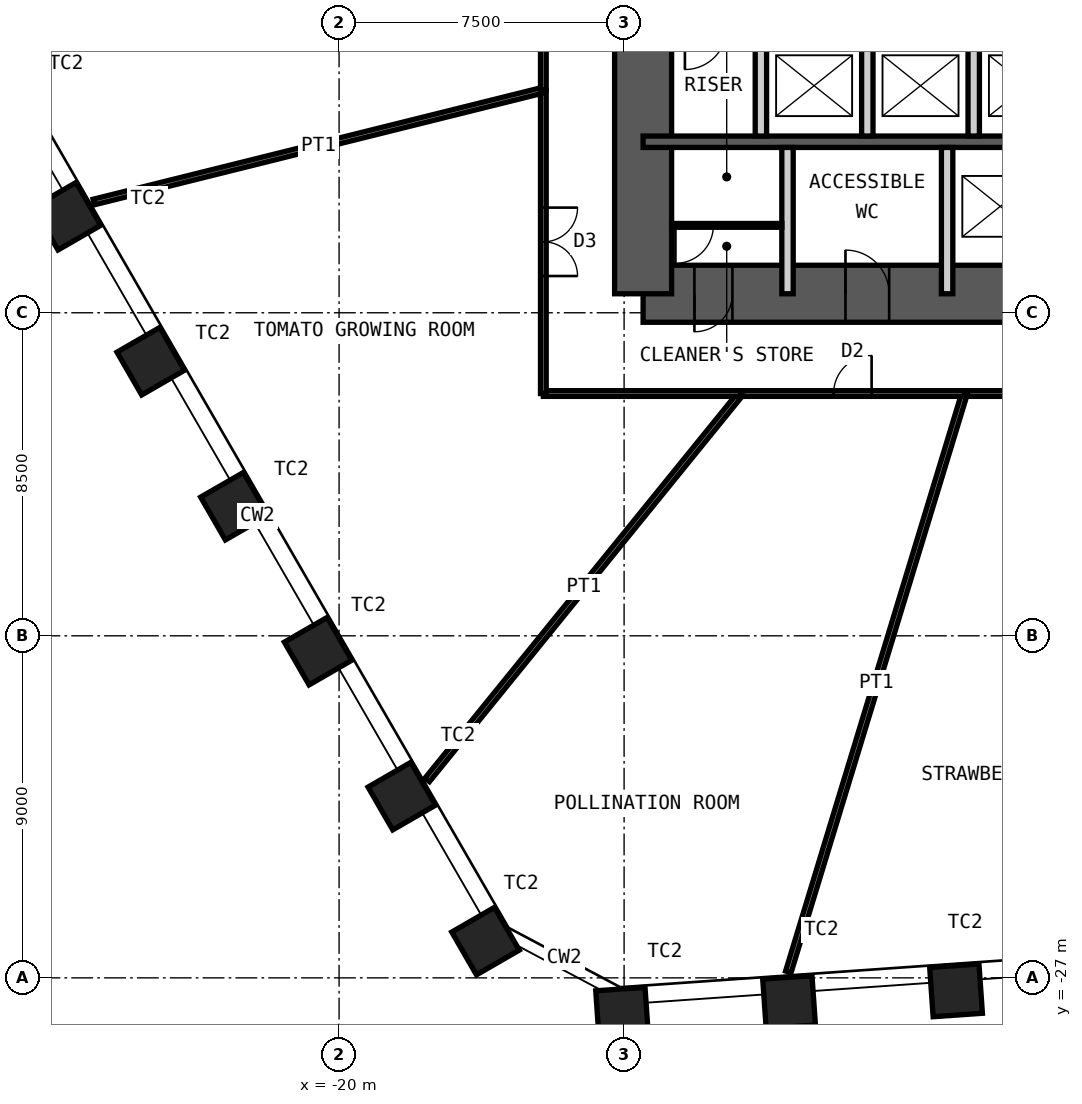
"""IFC4 building model, lengths in metres.
Left out: names, types, materials, properties, quantities, classifications, styles, units other than length and angle.
Written with IfcOpenShell. Run it as: python <this file> out.ifc"""

import sys

from ifc_helpers import new_model, si_unit, direction, frame, frame_2d, origin, origin_2d, place, context, subcontext, project, spatial, rectangle, hollow_rectangle, extrude, element, fill, save


model = new_model("IFC4")
c1 = context("Model", 3, precision=1e-05, world=origin(), true_north=direction((0.0, 1.0)))
c2 = subcontext(c1, "Body", "Model", "MODEL_VIEW")
j1 = project(units=[si_unit("LENGTHUNIT", "METRE"), si_unit("PLANEANGLEUNIT", "RADIAN")], contexts=[c1])
p1 = place(None, origin())
s1 = spatial("IfcSite", under=j1, at=p1, CompositionType="ELEMENT")
p2 = place(p1, origin())
s2 = spatial("IfcBuilding", under=s1, at=p2, CompositionType="ELEMENT")
p3 = place(p2, frame((0.0, 0.0, 72.0)))
s3 = spatial("IfcBuildingStorey", under=s2, at=p3, CompositionType="ELEMENT", Elevation=72.0)
for number, where, z_axis, x_axis in (
    (1, (-3.765, -27.329, 0.0), (0.0, 0.0, 1.0), (0.998, 0.07, 0.0)),
    (2, (-8.159, -27.636, 0.0), (0.0, 0.0, 1.0), (0.998, 0.07, 0.0)),
    (3, (-12.553, -27.944, 0.0), (0.0, 0.0, 1.0), (0.998, 0.07, 0.0)),
    (4, (-16.147, -26.033, 0.0), (0.0, 0.0, 1.0), (0.5, -0.866, 0.0)),
    (5, (-18.349, -22.218, 0.0), (0.0, 0.0, 1.0), (0.5, -0.866, 0.0)),
    (6, (-20.552, -18.404, 0.0), (0.0, 0.0, 1.0), (0.5, -0.866, 0.0)),
    (7, (-22.754, -14.589, 0.0), (0.0, 0.0, 1.0), (0.5, -0.866, 0.0)),
    (8, (-24.956, -10.775, 0.0), (0.0, 0.0, 1.0), (0.5, -0.866, 0.0)),
    (9, (-27.158, -6.96, 0.0), (0.0, 0.0, 1.0), (0.5, -0.866, 0.0)),
):
    element("IfcColumn", number, at=place(p3, frame(where, z_axis=z_axis, x_axis=x_axis)), inside=s3, PredefinedType="COLUMN", context=c2, shape_type="SweptSolid", body=[
        extrude(hollow_rectangle(XDim=1.3, YDim=1.3, WallThickness=0.1, at=origin_2d()), origin(), (0.0, 0.0, 1.0), 5.0),
    ])
p4 = place(p3, frame((-12.0, -9.0, 0.0), z_axis=(0.0, 0.0, 1.0), x_axis=(1.0, 0.0, 0.0)))
e10 = element("IfcWall", 10, at=p4, inside=s3, PredefinedType="SHEAR", context=c2, shape_type="SweptSolid", body=[
    extrude(rectangle(XDim=24.0, YDim=1.5, at=frame_2d((12.0, 0.0))), origin(), (0.0, 0.0, 1.0), 5.0),
])
p5 = place(p4, frame((1.35, 0.0, 0.0)))
e11 = element("IfcOpeningElement", 11, at=p5, cuts=e10, PredefinedType="OPENING", context=c2, shape_type="SweptSolid", body=[
    extrude(rectangle(XDim=1.0, YDim=2.1, at=frame_2d((0.5, 1.05))), frame((0.0, 0.76, 0.0), z_axis=(0.0, -1.0, 0.0), x_axis=(1.0, 0.0, 0.0)), (0.0, 0.0, 1.0), 1.52),
])
p6 = place(p4, frame((5.325, 0.0, 0.0)))
e12 = element("IfcOpeningElement", 12, at=p6, cuts=e10, PredefinedType="OPENING", context=c2, shape_type="SweptSolid", body=[
    extrude(rectangle(XDim=1.15, YDim=2.1, at=frame_2d((0.575, 1.05))), frame((0.0, 0.76, 0.0), z_axis=(0.0, -1.0, 0.0), x_axis=(1.0, 0.0, 0.0)), (0.0, 0.0, 1.0), 1.52),
])
p7 = place(p4, frame((12.6, 0.0, 0.0)))
e13 = element("IfcOpeningElement", 13, at=p7, cuts=e10, PredefinedType="OPENING", context=c2, shape_type="SweptSolid", body=[
    extrude(rectangle(XDim=1.0, YDim=2.1, at=frame_2d((0.5, 1.05))), frame((0.0, 0.76, 0.0), z_axis=(0.0, -1.0, 0.0), x_axis=(1.0, 0.0, 0.0)), (0.0, 0.0, 1.0), 1.52),
])
p8 = place(p3, frame((-12.0, -9.0, 0.0), z_axis=(0.0, 0.0, 1.0), x_axis=(0.0, 1.0, 0.0)))
e14 = element("IfcWall", 14, at=p8, inside=s3, PredefinedType="SHEAR", context=c2, shape_type="SweptSolid", body=[
    extrude(rectangle(XDim=18.0, YDim=1.5, at=frame_2d((9.0, 0.0))), origin(), (0.0, 0.0, 1.0), 5.0),
])
p9 = place(p8, frame((8.1, 0.0, 0.0)))
e15 = element("IfcOpeningElement", 15, at=p9, cuts=e14, PredefinedType="OPENING", context=c2, shape_type="SweptSolid", body=[
    extrude(rectangle(XDim=1.8, YDim=2.1, at=frame_2d((0.9, 1.05))), frame((0.0, 0.76, 0.0), z_axis=(0.0, -1.0, 0.0), x_axis=(1.0, 0.0, 0.0)), (0.0, 0.0, 1.0), 1.52),
])
p10 = place(p3, frame((-12.0, -5.0, 0.0), z_axis=(0.0, 0.0, 1.0), x_axis=(1.0, 0.0, 0.0)))
e16 = element("IfcWall", 16, at=p10, inside=s3, PredefinedType="SHEAR", context=c2, shape_type="SweptSolid", body=[
    extrude(rectangle(XDim=24.0, YDim=0.3, at=frame_2d((12.0, 0.0))), origin(), (0.0, 0.0, 1.0), 5.0),
])
for number, where, z_axis, x_axis in (
    (17, (-8.9, -4.85, 0.0), (0.0, 0.0, 1.0), (0.0, 1.0, 0.0)),
    (18, (-6.1, -4.85, 0.0), (0.0, 0.0, 1.0), (0.0, 1.0, 0.0)),
    (19, (-3.3, -4.85, 0.0), (0.0, 0.0, 1.0), (0.0, 1.0, 0.0)),
):
    element("IfcWall", number, at=place(p3, frame(where, z_axis=z_axis, x_axis=x_axis)), inside=s3, PredefinedType="PARTITIONING", context=c2, shape_type="SweptSolid", body=[
        extrude(rectangle(XDim=2.65, YDim=0.3, at=frame_2d((1.325, 0.0))), origin(), (0.0, 0.0, 1.0), 4.78),
    ])
for number, where, z_axis, x_axis in (
    (20, (-8.2, -9.0, 0.0), (0.0, 0.0, 1.0), (0.0, 1.0, 0.0)),
    (21, (-4.0, -9.0, 0.0), (0.0, 0.0, 1.0), (0.0, 1.0, 0.0)),
):
    element("IfcWall", number, at=place(p3, frame(where, z_axis=z_axis, x_axis=x_axis)), inside=s3, PredefinedType="PARTITIONING", context=c2, shape_type="SweptSolid", body=[
        extrude(rectangle(XDim=3.85, YDim=0.3, at=frame_2d((1.925, 0.0))), origin(), (0.0, 0.0, 1.0), 4.78),
    ])
p11 = place(p3, frame((-11.25, -7.2, 0.0), z_axis=(0.0, 0.0, 1.0), x_axis=(1.0, 0.0, 0.0)))
e22 = element("IfcWall", 22, at=p11, inside=s3, PredefinedType="PARTITIONING", context=c2, shape_type="SweptSolid", body=[
    extrude(rectangle(XDim=2.9, YDim=0.1, at=frame_2d((1.45, 0.0))), origin(), (0.0, 0.0, 1.0), 4.78),
])
p12 = place(p11, frame((0.1, 0.0, 0.0)))
e23 = element("IfcOpeningElement", 23, at=p12, cuts=e22, PredefinedType="OPENING", context=c2, shape_type="SweptSolid", body=[
    extrude(rectangle(XDim=1.0, YDim=2.4, at=frame_2d((0.5, 1.2))), frame((0.0, 0.06, 0.0), z_axis=(0.0, -1.0, 0.0), x_axis=(1.0, 0.0, 0.0)), (0.0, 0.0, 1.0), 0.12),
])
p13 = place(p3, frame((2.222, -11.625, 0.0), z_axis=(0.0, 0.0, 1.0), x_axis=(-1.0, 0.0, 0.0)))
e24 = element("IfcWall", 24, at=p13, inside=s3, PredefinedType="PARTITIONING", context=c2, shape_type="SweptSolid", body=[
    extrude(rectangle(XDim=5.764, YDim=0.15, at=frame_2d((2.882, 0.0))), origin(), (0.0, 0.0, 1.0), 4.8),
])
p14 = place(p13, frame((1.982, 0.0, 0.0)))
e25 = element("IfcOpeningElement", 25, at=p14, cuts=e24, PredefinedType="OPENING", context=c2, shape_type="SweptSolid", body=[
    extrude(rectangle(XDim=1.8, YDim=2.4, at=frame_2d((0.9, 1.2))), frame((0.0, 0.085, 0.0), z_axis=(0.0, -1.0, 0.0), x_axis=(1.0, 0.0, 0.0)), (0.0, 0.0, 1.0), 0.17),
])
p15 = place(p3, frame((-8.179, -26.843, 0.0), z_axis=(0.0, 0.0, 1.0), x_axis=(0.291466333136, 0.956581087336, 0.0)))
e26 = element("IfcWall", 26, at=p15, inside=s3, PredefinedType="PARTITIONING", context=c2, shape_type="SweptSolid", body=[
    extrude(rectangle(XDim=15.908, YDim=0.15, at=frame_2d((7.954, 0.0))), origin(), (0.0, 0.0, 1.0), 3.7),
])
p16 = place(p3, frame((-3.542, -11.625, 0.0), z_axis=(0.0, 0.0, 1.0), x_axis=(-1.0, 0.0, 0.0)))
e27 = element("IfcWall", 27, at=p16, inside=s3, PredefinedType="PARTITIONING", context=c2, shape_type="SweptSolid", body=[
    extrude(rectangle(XDim=5.89, YDim=0.15, at=frame_2d((2.945, 0.0))), origin(), (0.0, 0.0, 1.0), 4.8),
])
p17 = place(p16, frame((2.445, 0.0, 0.0)))
e28 = element("IfcOpeningElement", 28, at=p17, cuts=e27, PredefinedType="OPENING", context=c2, shape_type="SweptSolid", body=[
    extrude(rectangle(XDim=1.0, YDim=2.4, at=frame_2d((0.5, 1.2))), frame((0.0, 0.085, 0.0), z_axis=(0.0, -1.0, 0.0), x_axis=(1.0, 0.0, 0.0)), (0.0, 0.0, 1.0), 0.17),
])
p18 = place(p3, frame((-17.68, -21.791, 0.0), z_axis=(0.0, 0.0, 1.0), x_axis=(0.630054650118, 0.776550795418, 0.0)))
e29 = element("IfcWall", 29, at=p18, inside=s3, PredefinedType="PARTITIONING", context=c2, shape_type="SweptSolid", body=[
    extrude(rectangle(XDim=13.091, YDim=0.15, at=frame_2d((6.545, 0.0))), origin(), (0.0, 0.0, 1.0), 3.7),
])
p19 = place(p3, frame((-9.432, -11.625, 0.0), z_axis=(0.0, 0.0, 1.0), x_axis=(-1.0, 0.0, 0.0)))
e30 = element("IfcWall", 30, at=p19, inside=s3, PredefinedType="PARTITIONING", context=c2, shape_type="SweptSolid", body=[
    extrude(rectangle(XDim=5.193, YDim=0.15, at=frame_2d((2.596, 0.0))), origin(), (0.0, 0.0, 1.0), 4.8),
])
p20 = place(p3, frame((-14.625, -11.625, 0.0), z_axis=(0.0, 0.0, 1.0), x_axis=(0.0, 1.0, 0.0)))
e31 = element("IfcWall", 31, at=p20, inside=s3, PredefinedType="PARTITIONING", context=c2, shape_type="SweptSolid", body=[
    extrude(rectangle(XDim=7.984, YDim=0.15, at=frame_2d((3.992, 0.0))), origin(), (0.0, 0.0, 1.0), 4.8),
])
p21 = place(p20, frame((3.092, 0.0, 0.0)))
e32 = element("IfcOpeningElement", 32, at=p21, cuts=e31, PredefinedType="OPENING", context=c2, shape_type="SweptSolid", body=[
    extrude(rectangle(XDim=1.8, YDim=2.4, at=frame_2d((0.9, 1.2))), frame((0.0, 0.085, 0.0), z_axis=(0.0, -1.0, 0.0), x_axis=(1.0, 0.0, 0.0)), (0.0, 0.0, 1.0), 0.17),
])
p22 = place(p3, frame((-26.455, -6.586, 0.0), z_axis=(0.0, 0.0, 1.0), x_axis=(0.970383505188, 0.241569561118, 0.0)))
e33 = element("IfcWall", 33, at=p22, inside=s3, PredefinedType="PARTITIONING", context=c2, shape_type="SweptSolid", body=[
    extrude(rectangle(XDim=12.191, YDim=0.15, at=frame_2d((6.096, 0.0))), origin(), (0.0, 0.0, 1.0), 3.7),
])
p23 = place(p3, frame((-14.625, -3.641, 0.0), z_axis=(0.0, 0.0, 1.0), x_axis=(0.0, 1.0, 0.0)))
e34 = element("IfcWall", 34, at=p23, inside=s3, PredefinedType="PARTITIONING", context=c2, shape_type="SweptSolid", body=[
    extrude(rectangle(XDim=11.66, YDim=0.15, at=frame_2d((5.83, 0.0))), origin(), (0.0, 0.0, 1.0), 4.8),
])
p24 = place(p23, frame((4.93, 0.0, 0.0)))
e35 = element("IfcOpeningElement", 35, at=p24, cuts=e34, PredefinedType="OPENING", context=c2, shape_type="SweptSolid", body=[
    extrude(rectangle(XDim=1.8, YDim=2.4, at=frame_2d((0.9, 1.2))), frame((0.0, 0.085, 0.0), z_axis=(0.0, -1.0, 0.0), x_axis=(1.0, 0.0, 0.0)), (0.0, 0.0, 1.0), 0.17),
])
p25 = place(p5, origin())
e36 = element("IfcDoor", 36, at=p25, inside=s3, OperationType="SINGLE_SWING_LEFT", PredefinedType="DOOR", context=c2, shape_type="SweptSolid", body=[
    extrude(rectangle(XDim=1.0, YDim=2.1, at=frame_2d((0.5, 1.05))), frame((0.0, 0.025, 0.0), z_axis=(0.0, -1.0, 0.0), x_axis=(1.0, 0.0, 0.0)), (0.0, 0.0, 1.0), 0.05),
])
fill(e11, e36)
p26 = place(p6, origin())
e37 = element("IfcDoor", 37, at=p26, inside=s3, OperationType="SINGLE_SWING_RIGHT", PredefinedType="DOOR", context=c2, shape_type="SweptSolid", body=[
    extrude(rectangle(XDim=1.15, YDim=2.1, at=frame_2d((0.575, 1.05))), frame((0.0, 0.025, 0.0), z_axis=(0.0, -1.0, 0.0), x_axis=(1.0, 0.0, 0.0)), (0.0, 0.0, 1.0), 0.05),
])
fill(e12, e37)
p27 = place(p12, origin())
e38 = element("IfcDoor", 38, at=p27, inside=s3, OperationType="SINGLE_SWING_LEFT", PredefinedType="DOOR", context=c2, shape_type="SweptSolid", body=[
    extrude(rectangle(XDim=1.0, YDim=2.4, at=frame_2d((0.5, 1.2))), frame((0.0, 0.025, 0.0), z_axis=(0.0, -1.0, 0.0), x_axis=(1.0, 0.0, 0.0)), (0.0, 0.0, 1.0), 0.05),
])
fill(e23, e38)
p28 = place(p17, origin())
e39 = element("IfcDoor", 39, at=p28, inside=s3, OperationType="SINGLE_SWING_LEFT", PredefinedType="DOOR", context=c2, shape_type="SweptSolid", body=[
    extrude(rectangle(XDim=1.0, YDim=2.4, at=frame_2d((0.5, 1.2))), frame((0.0, 0.025, 0.0), z_axis=(0.0, -1.0, 0.0), x_axis=(1.0, 0.0, 0.0)), (0.0, 0.0, 1.0), 0.05),
])
fill(e28, e39)
p29 = place(p21, origin())
e40 = element("IfcDoor", 40, at=p29, inside=s3, OperationType="DOUBLE_DOOR_DOUBLE_SWING", PredefinedType="DOOR", context=c2, shape_type="SweptSolid", body=[
    extrude(rectangle(XDim=1.8, YDim=2.4, at=frame_2d((0.9, 1.2))), frame((0.0, 0.025, 0.0), z_axis=(0.0, -1.0, 0.0), x_axis=(1.0, 0.0, 0.0)), (0.0, 0.0, 1.0), 0.05),
])
fill(e32, e40)
save(model, sys.argv[1])
